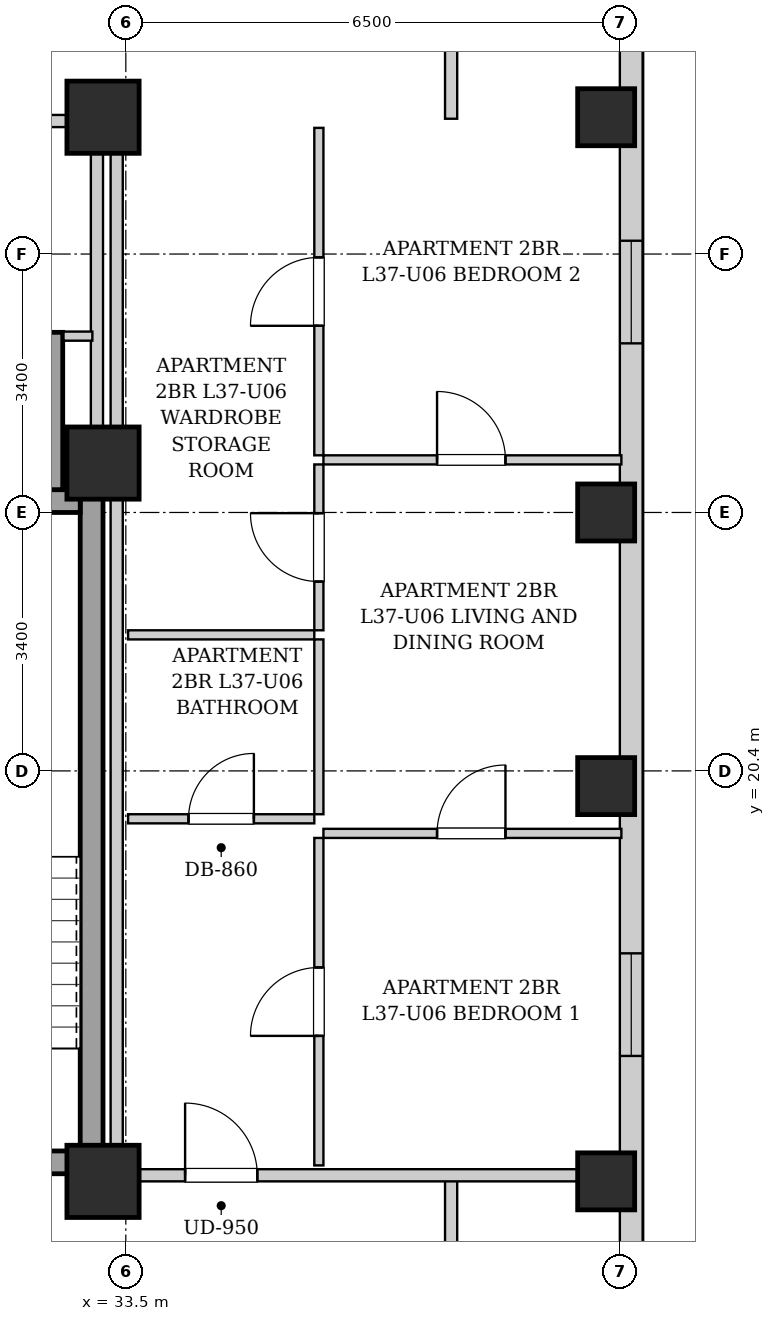
"""IFC4 building model, lengths in metres.
Left out: names, types, materials, properties, quantities, classifications, styles, units other than length and angle.
Written with IfcOpenShell. Run it as: python <this file> out.ifc"""

import sys

from ifc_helpers import new_model, si_unit, direction, frame, frame_2d, origin, origin_2d, place, context, subcontext, project, spatial, rectangle, extrude, element, fill, save


model = new_model("IFC4")
c1 = context("Model", 3, precision=1e-05, world=origin(), true_north=direction((0.0, 1.0)))
c2 = subcontext(c1, "Body", "Model", "MODEL_VIEW")
j1 = project(units=[si_unit("LENGTHUNIT", "METRE"), si_unit("PLANEANGLEUNIT", "RADIAN")], contexts=[c1])
p1 = place(None, origin())
s1 = spatial("IfcSite", under=j1, at=p1, CompositionType="ELEMENT")
p2 = place(p1, origin())
s2 = spatial("IfcBuilding", under=s1, at=p2, CompositionType="ELEMENT")
p3 = place(p2, frame((0.0, 0.0, 130.9)))
s3 = spatial("IfcBuildingStorey", under=s2, at=p3, CompositionType="ELEMENT", Elevation=130.9)
for number, where, z_axis, x_axis in (
    (1, (39.82, 15.0, 0.0), (0.0, 0.0, 1.0), (1.0, 0.0, 0.0)),
    (2, (39.82, 20.2, 0.0), (0.0, 0.0, 1.0), (1.0, 0.0, 0.0)),
    (3, (39.82, 23.8, 0.0), (0.0, 0.0, 1.0), (1.0, 0.0, 0.0)),
    (4, (39.82, 29.0, 0.0), (0.0, 0.0, 1.0), (1.0, 0.0, 0.0)),
):
    element("IfcColumn", number, at=place(p3, frame(where, z_axis=z_axis, x_axis=x_axis)), inside=s3, PredefinedType="COLUMN", context=c2, shape_type="SweptSolid", body=[
        extrude(rectangle(XDim=0.75, YDim=0.75, at=origin_2d()), origin(), (0.0, 0.0, 1.0), 3.25),
    ])
for number, where, z_axis, x_axis in (
    (5, (33.2, 15.0, 0.0), (0.0, 0.0, 1.0), (1.0, 0.0, 0.0)),
    (6, (33.2, 29.0, 0.0), (0.0, 0.0, 1.0), (1.0, 0.0, 0.0)),
    (7, (33.2, 24.45, 0.0), (0.0, 0.0, 1.0), (1.0, 0.0, 0.0)),
):
    element("IfcColumn", number, at=place(p3, frame(where, z_axis=z_axis, x_axis=x_axis)), inside=s3, PredefinedType="COLUMN", context=c2, shape_type="SweptSolid", body=[
        extrude(rectangle(XDim=0.95, YDim=0.95, at=origin_2d()), origin(), (0.0, 0.0, 1.0), 3.25),
    ])
p4 = place(p3, frame((40.15, 40.8, 0.0), z_axis=(0.0, 0.0, 1.0), x_axis=(0.0, -1.0, 0.0)))
e8 = element("IfcWall", 8, at=p4, inside=s3, PredefinedType="SOLIDWALL", context=c2, shape_type="SweptSolid", body=[
    extrude(rectangle(XDim=34.5, YDim=0.3, at=frame_2d((17.25, 0.0))), origin(), (0.0, 0.0, 1.0), 2.99),
])
p5 = place(p4, frame((31.575, 0.0, 0.55)))
e9 = element("IfcOpeningElement", 9, at=p5, cuts=e8, PredefinedType="OPENING", context=c2, shape_type="SweptSolid", body=[
    extrude(rectangle(XDim=1.35, YDim=1.2, at=frame_2d((0.675, 0.6))), frame((0.0, 0.16, 0.0), z_axis=(0.0, -1.0, 0.0), x_axis=(1.0, 0.0, 0.0)), (0.0, 0.0, 1.0), 0.32),
])
p6 = place(p4, frame((3.075, 0.0, 0.55)))
e10 = element("IfcOpeningElement", 10, at=p6, cuts=e8, PredefinedType="OPENING", context=c2, shape_type="SweptSolid", body=[
    extrude(rectangle(XDim=1.35, YDim=1.2, at=frame_2d((0.675, 0.6))), frame((0.0, 0.16, 0.0), z_axis=(0.0, -1.0, 0.0), x_axis=(1.0, 0.0, 0.0)), (0.0, 0.0, 1.0), 0.32),
])
p7 = place(p4, frame((1.085, 0.0, 0.55)))
e11 = element("IfcOpeningElement", 11, at=p7, cuts=e8, PredefinedType="OPENING", context=c2, shape_type="SweptSolid", body=[
    extrude(rectangle(XDim=1.35, YDim=1.2, at=frame_2d((0.675, 0.6))), frame((0.0, 0.16, 0.0), z_axis=(0.0, -1.0, 0.0), x_axis=(1.0, 0.0, 0.0)), (0.0, 0.0, 1.0), 0.32),
])
p8 = place(p4, frame((22.8, 0.0, 0.55)))
e12 = element("IfcOpeningElement", 12, at=p8, cuts=e8, PredefinedType="OPENING", context=c2, shape_type="SweptSolid", body=[
    extrude(rectangle(XDim=1.35, YDim=1.2, at=frame_2d((0.675, 0.6))), frame((0.0, 0.16, 0.0), z_axis=(0.0, -1.0, 0.0), x_axis=(1.0, 0.0, 0.0)), (0.0, 0.0, 1.0), 0.32),
])
p9 = place(p4, frame((13.425, 0.0, 0.55)))
e13 = element("IfcOpeningElement", 13, at=p9, cuts=e8, PredefinedType="OPENING", context=c2, shape_type="SweptSolid", body=[
    extrude(rectangle(XDim=1.35, YDim=1.2, at=frame_2d((0.675, 0.6))), frame((0.0, 0.16, 0.0), z_axis=(0.0, -1.0, 0.0), x_axis=(1.0, 0.0, 0.0)), (0.0, 0.0, 1.0), 0.32),
])
p10 = place(p3, frame((33.05, 15.1, 0.0), z_axis=(0.0, 0.0, 1.0), x_axis=(0.0, 1.0, 0.0)))
e14 = element("IfcWall", 14, at=p10, inside=s3, PredefinedType="SHEAR", context=c2, shape_type="SweptSolid", body=[
    extrude(rectangle(XDim=9.0, YDim=0.3, at=frame_2d((4.5, 0.0))), origin(), (0.0, 0.0, 1.0), 2.99),
])
p11 = place(p3, frame((30.05, 23.95, 0.0), z_axis=(0.0, 0.0, 1.0), x_axis=(1.0, 0.0, 0.0)))
e15 = element("IfcWall", 15, at=p11, inside=s3, PredefinedType="SHEAR", context=c2, shape_type="SweptSolid", body=[
    extrude(rectangle(XDim=2.85, YDim=0.3, at=frame_2d((1.425, 0.0))), origin(), (0.0, 0.0, 1.0), 2.99),
])
p12 = place(p3, frame((30.05, 15.25, 0.0), z_axis=(0.0, 0.0, 1.0), x_axis=(1.0, 0.0, 0.0)))
e16 = element("IfcWall", 16, at=p12, inside=s3, PredefinedType="SHEAR", context=c2, shape_type="SweptSolid", body=[
    extrude(rectangle(XDim=2.85, YDim=0.3, at=frame_2d((1.425, 0.0))), origin(), (0.0, 0.0, 1.0), 2.99),
])
p13 = place(p12, frame((0.86, 0.0, 0.0)))
e17 = element("IfcOpeningElement", 17, at=p13, cuts=e16, PredefinedType="OPENING", context=c2, shape_type="SweptSolid", body=[
    extrude(rectangle(XDim=1.1, YDim=2.05, at=frame_2d((0.55, 1.025))), frame((0.0, 0.16, 0.0), z_axis=(0.0, -1.0, 0.0), x_axis=(1.0, 0.0, 0.0)), (0.0, 0.0, 1.0), 0.32),
])
p14 = place(p3, frame((32.56, 24.1, 0.0), z_axis=(0.0, 0.0, 1.0), x_axis=(0.0, 1.0, 0.0)))
e18 = element("IfcWall", 18, at=p14, inside=s3, PredefinedType="SHEAR", context=c2, shape_type="SweptSolid", body=[
    extrude(rectangle(XDim=2.07, YDim=0.22, at=frame_2d((1.035, 0.0))), origin(), (0.0, 0.0, 1.0), 2.99),
])
p15 = place(p3, frame((33.12, 24.12, 0.0), z_axis=(0.0, 0.0, 1.0), x_axis=(0.0, 1.0, 0.0)))
e19 = element("IfcWall", 19, at=p15, inside=s3, PredefinedType="PARTITIONING", context=c2, shape_type="SweptSolid", body=[
    extrude(rectangle(XDim=4.76, YDim=0.16, at=frame_2d((2.38, 0.0))), origin(), (0.0, 0.0, 1.0), 2.99),
])
p16 = place(p3, frame((32.68, 26.12, 0.0), z_axis=(0.0, 0.0, 1.0), x_axis=(1.0, 0.0, 0.0)))
e20 = element("IfcWall", 20, at=p16, inside=s3, PredefinedType="PARTITIONING", context=c2, shape_type="SweptSolid", body=[
    extrude(rectangle(XDim=0.38, YDim=0.12, at=frame_2d((0.19, 0.0))), origin(), (0.0, 0.0, 1.0), 2.99),
])
p17 = place(p3, frame((30.08, 28.95, 0.0), z_axis=(0.0, 0.0, 1.0), x_axis=(1.0, 0.0, 0.0)))
e21 = element("IfcWall", 21, at=p17, inside=s3, PredefinedType="PARTITIONING", context=c2, shape_type="SweptSolid", body=[
    extrude(rectangle(XDim=2.96, YDim=0.16, at=frame_2d((1.48, 0.0))), origin(), (0.0, 0.0, 1.0), 2.99),
])
p18 = place(p17, frame((0.695, 0.0, 0.0)))
e22 = element("IfcOpeningElement", 22, at=p18, cuts=e21, PredefinedType="OPENING", context=c2, shape_type="SweptSolid", body=[
    extrude(rectangle(XDim=0.86, YDim=2.05, at=frame_2d((0.43, 1.025))), frame((0.0, 0.09, 0.0), z_axis=(0.0, -1.0, 0.0), x_axis=(1.0, 0.0, 0.0)), (0.0, 0.0, 1.0), 0.18),
])
for number, where, z_axis, x_axis in (
    (23, (37.78, 13.35, 0.0), (0.0, 0.0, 1.0), (0.0, 1.0, 0.0)),
    (24, (37.78, 28.98, 0.0), (0.0, 0.0, 1.0), (0.0, 1.0, 0.0)),
):
    element("IfcWall", number, at=place(p3, frame(where, z_axis=z_axis, x_axis=x_axis)), inside=s3, PredefinedType="PARTITIONING", context=c2, shape_type="SweptSolid", body=[
        extrude(rectangle(XDim=1.74, YDim=0.16, at=frame_2d((0.87, 0.0))), origin(), (0.0, 0.0, 1.0), 2.99),
    ])
p19 = place(p3, frame((33.38, 15.08, 0.0), z_axis=(0.0, 0.0, 1.0), x_axis=(1.0, 0.0, 0.0)))
e25 = element("IfcWall", 25, at=p19, inside=s3, PredefinedType="PARTITIONING", context=c2, shape_type="SweptSolid", body=[
    extrude(rectangle(XDim=6.64, YDim=0.16, at=frame_2d((3.32, 0.0))), origin(), (0.0, 0.0, 1.0), 2.426),
])
p20 = place(p19, frame((0.9, 0.0, 0.0)))
e26 = element("IfcOpeningElement", 26, at=p20, cuts=e25, PredefinedType="OPENING", context=c2, shape_type="SweptSolid", body=[
    extrude(rectangle(XDim=0.95, YDim=2.1, at=frame_2d((0.475, 1.05))), frame((0.0, 0.09, 0.0), z_axis=(0.0, -1.0, 0.0), x_axis=(1.0, 0.0, 0.0)), (0.0, 0.0, 1.0), 0.18),
])
p21 = place(p3, frame((33.53, 22.19, 0.0), z_axis=(0.0, 0.0, 1.0), x_axis=(1.0, 0.0, 0.0)))
e27 = element("IfcWall", 27, at=p21, inside=s3, PredefinedType="PARTITIONING", context=c2, shape_type="SweptSolid", body=[
    extrude(rectangle(XDim=2.45, YDim=0.12, at=frame_2d((1.225, 0.0))), origin(), (0.0, 0.0, 1.0), 2.99),
])
p22 = place(p3, frame((36.04, 22.25, 0.0), z_axis=(0.0, 0.0, 1.0), x_axis=(0.0, 1.0, 0.0)))
e28 = element("IfcWall", 28, at=p22, inside=s3, PredefinedType="PARTITIONING", context=c2, shape_type="SweptSolid", body=[
    extrude(rectangle(XDim=2.182, YDim=0.12, at=frame_2d((1.091, 0.0))), origin(), (0.0, 0.0, 1.0), 2.99),
])
p23 = place(p22, frame((0.641, 0.0, 0.0)))
e29 = element("IfcOpeningElement", 29, at=p23, cuts=e28, PredefinedType="OPENING", context=c2, shape_type="SweptSolid", body=[
    extrude(rectangle(XDim=0.9, YDim=2.05, at=frame_2d((0.45, 1.025))), frame((0.0, 0.07, 0.0), z_axis=(0.0, -1.0, 0.0), x_axis=(1.0, 0.0, 0.0)), (0.0, 0.0, 1.0), 0.14),
])
p24 = place(p3, frame((36.04, 24.552, 0.0), z_axis=(0.0, 0.0, 1.0), x_axis=(0.0, 1.0, 0.0)))
e30 = element("IfcWall", 30, at=p24, inside=s3, PredefinedType="PARTITIONING", context=c2, shape_type="SweptSolid", body=[
    extrude(rectangle(XDim=4.308, YDim=0.12, at=frame_2d((2.154, 0.0))), origin(), (0.0, 0.0, 1.0), 2.99),
])
p25 = place(p24, frame((1.704, 0.0, 0.0)))
e31 = element("IfcOpeningElement", 31, at=p25, cuts=e30, PredefinedType="OPENING", context=c2, shape_type="SweptSolid", body=[
    extrude(rectangle(XDim=0.9, YDim=2.05, at=frame_2d((0.45, 1.025))), frame((0.0, 0.07, 0.0), z_axis=(0.0, -1.0, 0.0), x_axis=(1.0, 0.0, 0.0)), (0.0, 0.0, 1.0), 0.14),
])
p26 = place(p3, frame((33.53, 19.77, 0.0), z_axis=(0.0, 0.0, 1.0), x_axis=(1.0, 0.0, 0.0)))
e32 = element("IfcWall", 32, at=p26, inside=s3, PredefinedType="PARTITIONING", context=c2, shape_type="SweptSolid", body=[
    extrude(rectangle(XDim=2.45, YDim=0.12, at=frame_2d((1.225, 0.0))), origin(), (0.0, 0.0, 1.0), 2.99),
])
p27 = place(p26, frame((0.795, 0.0, 0.0)))
e33 = element("IfcOpeningElement", 33, at=p27, cuts=e32, PredefinedType="OPENING", context=c2, shape_type="SweptSolid", body=[
    extrude(rectangle(XDim=0.86, YDim=2.05, at=frame_2d((0.43, 1.025))), frame((0.0, 0.07, 0.0), z_axis=(0.0, -1.0, 0.0), x_axis=(1.0, 0.0, 0.0)), (0.0, 0.0, 1.0), 0.14),
])
p28 = place(p3, frame((36.04, 19.83, 0.0), z_axis=(0.0, 0.0, 1.0), x_axis=(0.0, 1.0, 0.0)))
e34 = element("IfcWall", 34, at=p28, inside=s3, PredefinedType="PARTITIONING", context=c2, shape_type="SweptSolid", body=[
    extrude(rectangle(XDim=2.3, YDim=0.12, at=frame_2d((1.15, 0.0))), origin(), (0.0, 0.0, 1.0), 2.99),
])
p29 = place(p3, frame((36.04, 15.21, 0.0), z_axis=(0.0, 0.0, 1.0), x_axis=(0.0, 1.0, 0.0)))
e35 = element("IfcWall", 35, at=p29, inside=s3, PredefinedType="PARTITIONING", context=c2, shape_type="SweptSolid", body=[
    extrude(rectangle(XDim=4.308, YDim=0.12, at=frame_2d((2.154, 0.0))), origin(), (0.0, 0.0, 1.0), 2.99),
])
p30 = place(p29, frame((1.704, 0.0, 0.0)))
e36 = element("IfcOpeningElement", 36, at=p30, cuts=e35, PredefinedType="OPENING", context=c2, shape_type="SweptSolid", body=[
    extrude(rectangle(XDim=0.9, YDim=2.05, at=frame_2d((0.45, 1.025))), frame((0.0, 0.07, 0.0), z_axis=(0.0, -1.0, 0.0), x_axis=(1.0, 0.0, 0.0)), (0.0, 0.0, 1.0), 0.14),
])
p31 = place(p3, frame((36.1, 19.578, 0.0), z_axis=(0.0, 0.0, 1.0), x_axis=(1.0, 0.0, 0.0)))
e37 = element("IfcWall", 37, at=p31, inside=s3, PredefinedType="PARTITIONING", context=c2, shape_type="SweptSolid", body=[
    extrude(rectangle(XDim=3.92, YDim=0.12, at=frame_2d((1.96, 0.0))), origin(), (0.0, 0.0, 1.0), 2.99),
])
p32 = place(p31, frame((1.495, 0.0, 0.0)))
e38 = element("IfcOpeningElement", 38, at=p32, cuts=e37, PredefinedType="OPENING", context=c2, shape_type="SweptSolid", body=[
    extrude(rectangle(XDim=0.9, YDim=2.05, at=frame_2d((0.45, 1.025))), frame((0.0, 0.07, 0.0), z_axis=(0.0, -1.0, 0.0), x_axis=(1.0, 0.0, 0.0)), (0.0, 0.0, 1.0), 0.14),
])
p33 = place(p3, frame((36.1, 24.492, 0.0), z_axis=(0.0, 0.0, 1.0), x_axis=(1.0, 0.0, 0.0)))
e39 = element("IfcWall", 39, at=p33, inside=s3, PredefinedType="PARTITIONING", context=c2, shape_type="SweptSolid", body=[
    extrude(rectangle(XDim=3.92, YDim=0.12, at=frame_2d((1.96, 0.0))), origin(), (0.0, 0.0, 1.0), 2.621),
])
p34 = place(p33, frame((1.495, 0.0, 0.0)))
e40 = element("IfcOpeningElement", 40, at=p34, cuts=e39, PredefinedType="OPENING", context=c2, shape_type="SweptSolid", body=[
    extrude(rectangle(XDim=0.9, YDim=2.05, at=frame_2d((0.45, 1.025))), frame((0.0, 0.07, 0.0), z_axis=(0.0, -1.0, 0.0), x_axis=(1.0, 0.0, 0.0)), (0.0, 0.0, 1.0), 0.14),
])
p35 = place(p3, frame((33.38, 15.02, 0.0), z_axis=(0.0, 0.0, 1.0), x_axis=(0.0, 1.0, 0.0)))
e41 = element("IfcWall", 41, at=p35, inside=s3, PredefinedType="PARTITIONING", context=c2, shape_type="SweptSolid", body=[
    extrude(rectangle(XDim=13.98, YDim=0.16, at=frame_2d((6.99, 0.0))), origin(), (0.0, 0.0, 1.0), 2.99),
])
p36 = place(p20, origin())
e42 = element("IfcDoor", 42, at=p36, inside=s3, OperationType="SINGLE_SWING_LEFT", PredefinedType="DOOR", context=c2, shape_type="SweptSolid", body=[
    extrude(rectangle(XDim=0.95, YDim=2.1, at=frame_2d((0.475, 1.05))), frame((0.0, 0.025, 0.0), z_axis=(0.0, -1.0, 0.0), x_axis=(1.0, 0.0, 0.0)), (0.0, 0.0, 1.0), 0.05),
])
fill(e26, e42)
p37 = place(p23, origin())
e43 = element("IfcDoor", 43, at=p37, inside=s3, OperationType="SINGLE_SWING_RIGHT", PredefinedType="DOOR", context=c2, shape_type="SweptSolid", body=[
    extrude(rectangle(XDim=0.9, YDim=2.05, at=frame_2d((0.45, 1.025))), frame((0.0, 0.025, 0.0), z_axis=(0.0, -1.0, 0.0), x_axis=(1.0, 0.0, 0.0)), (0.0, 0.0, 1.0), 0.05),
])
fill(e29, e43)
p38 = place(p25, origin())
e44 = element("IfcDoor", 44, at=p38, inside=s3, OperationType="SINGLE_SWING_LEFT", PredefinedType="DOOR", context=c2, shape_type="SweptSolid", body=[
    extrude(rectangle(XDim=0.9, YDim=2.05, at=frame_2d((0.45, 1.025))), frame((0.0, 0.025, 0.0), z_axis=(0.0, -1.0, 0.0), x_axis=(1.0, 0.0, 0.0)), (0.0, 0.0, 1.0), 0.05),
])
fill(e31, e44)
p39 = place(p27, origin())
e45 = element("IfcDoor", 45, at=p39, inside=s3, OperationType="SINGLE_SWING_RIGHT", PredefinedType="DOOR", context=c2, shape_type="SweptSolid", body=[
    extrude(rectangle(XDim=0.86, YDim=2.05, at=frame_2d((0.43, 1.025))), frame((0.0, 0.025, 0.0), z_axis=(0.0, -1.0, 0.0), x_axis=(1.0, 0.0, 0.0)), (0.0, 0.0, 1.0), 0.05),
])
fill(e33, e45)
p40 = place(p30, origin())
e46 = element("IfcDoor", 46, at=p40, inside=s3, OperationType="SINGLE_SWING_LEFT", PredefinedType="DOOR", context=c2, shape_type="SweptSolid", body=[
    extrude(rectangle(XDim=0.9, YDim=2.05, at=frame_2d((0.45, 1.025))), frame((0.0, 0.025, 0.0), z_axis=(0.0, -1.0, 0.0), x_axis=(1.0, 0.0, 0.0)), (0.0, 0.0, 1.0), 0.05),
])
fill(e36, e46)
p41 = place(p32, origin())
e47 = element("IfcDoor", 47, at=p41, inside=s3, OperationType="SINGLE_SWING_RIGHT", PredefinedType="DOOR", context=c2, shape_type="SweptSolid", body=[
    extrude(rectangle(XDim=0.9, YDim=2.05, at=frame_2d((0.45, 1.025))), frame((0.0, 0.025, 0.0), z_axis=(0.0, -1.0, 0.0), x_axis=(1.0, 0.0, 0.0)), (0.0, 0.0, 1.0), 0.05),
])
fill(e38, e47)
p42 = place(p34, origin())
e48 = element("IfcDoor", 48, at=p42, inside=s3, OperationType="SINGLE_SWING_LEFT", PredefinedType="DOOR", context=c2, shape_type="SweptSolid", body=[
    extrude(rectangle(XDim=0.9, YDim=2.05, at=frame_2d((0.45, 1.025))), frame((0.0, 0.025, 0.0), z_axis=(0.0, -1.0, 0.0), x_axis=(1.0, 0.0, 0.0)), (0.0, 0.0, 1.0), 0.05),
])
fill(e40, e48)
p43 = place(p8, origin())
e49 = element("IfcWindow", 49, at=p43, inside=s3, PartitioningType="SINGLE_PANEL", PredefinedType="WINDOW", context=c2, shape_type="SweptSolid", body=[
    extrude(rectangle(XDim=1.35, YDim=1.2, at=frame_2d((0.675, 0.6))), frame((0.0, 0.03, 0.0), z_axis=(0.0, -1.0, 0.0), x_axis=(1.0, 0.0, 0.0)), (0.0, 0.0, 1.0), 0.06),
])
fill(e12, e49)
p44 = place(p9, origin())
e50 = element("IfcWindow", 50, at=p44, inside=s3, PartitioningType="SINGLE_PANEL", PredefinedType="WINDOW", context=c2, shape_type="SweptSolid", body=[
    extrude(rectangle(XDim=1.35, YDim=1.2, at=frame_2d((0.675, 0.6))), frame((0.0, 0.03, 0.0), z_axis=(0.0, -1.0, 0.0), x_axis=(1.0, 0.0, 0.0)), (0.0, 0.0, 1.0), 0.06),
])
fill(e13, e50)
save(model, sys.argv[1])
